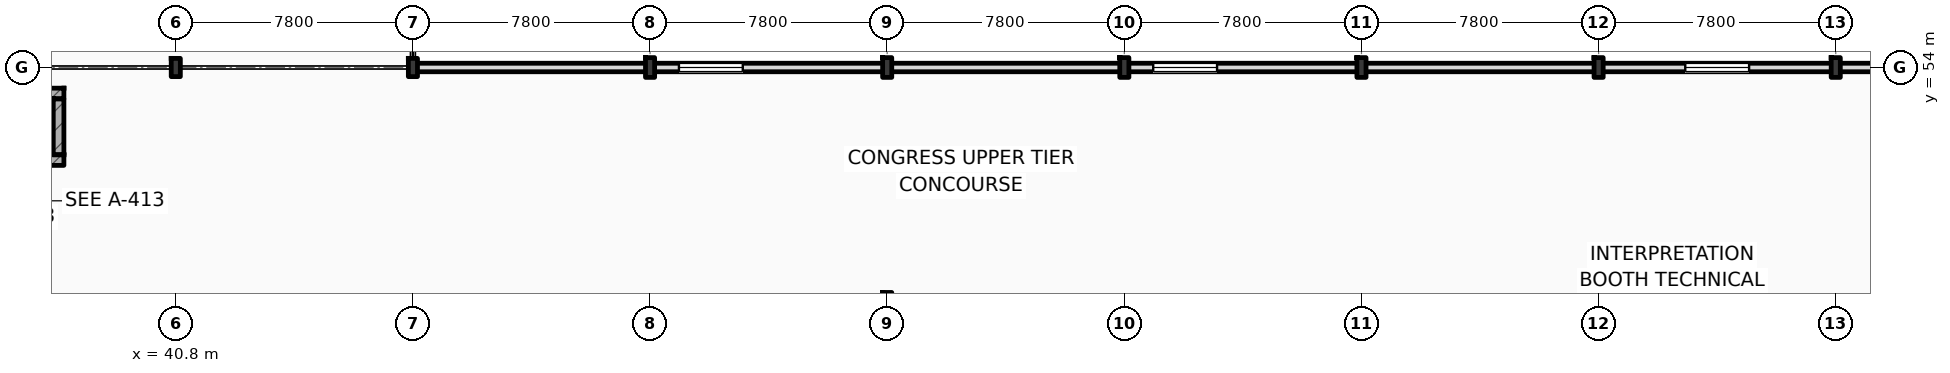
"""IFC4 building model, lengths in metres.
Left out: names, types, materials, properties, quantities, classifications, styles, units other than length and angle.
Written with IfcOpenShell. Run it as: python <this file> out.ifc"""

import sys

from ifc_helpers import new_model, si_unit, direction, frame, frame_2d, origin, origin_2d, place, context, subcontext, project, spatial, rectangle, i_section, extrude, element, fill, save


model = new_model("IFC4")
c1 = context("Model", 3, precision=1e-05, world=origin(), true_north=direction((0.0, 1.0)))
c2 = subcontext(c1, "Body", "Model", "MODEL_VIEW")
j1 = project(units=[si_unit("LENGTHUNIT", "METRE"), si_unit("PLANEANGLEUNIT", "RADIAN")], contexts=[c1])
p1 = place(None, origin())
s1 = spatial("IfcSite", under=j1, at=p1, CompositionType="ELEMENT")
p2 = place(p1, origin())
s2 = spatial("IfcBuilding", under=s1, at=p2, CompositionType="ELEMENT")
p3 = place(p2, frame((0.0, 0.0, 6.0)))
s3 = spatial("IfcBuildingStorey", under=s2, at=p3, CompositionType="ELEMENT", Elevation=6.0)
for number, where, z_axis, x_axis in (
    (1, (40.8, 54.0, 0.0), (0.0, 0.0, 1.0), (1.0, 0.0, 0.0)),
    (2, (48.6, 54.0, 0.0), (0.0, 0.0, 1.0), (1.0, 0.0, 0.0)),
):
    element("IfcColumn", number, at=place(p3, frame(where, z_axis=z_axis, x_axis=x_axis)), inside=s3, PredefinedType="COLUMN", context=c2, shape_type="SweptSolid", body=[
        extrude(i_section(OverallWidth=0.3, OverallDepth=0.6, WebThickness=0.015, FlangeThickness=0.03, FilletRadius=0.027, at=origin_2d()), origin(), (0.0, 0.0, 1.0), 5.4),
    ])
for number, where, z_axis, x_axis in (
    (3, (56.4, 54.0, 0.0), (0.0, 0.0, 1.0), (1.0, 0.0, 0.0)),
    (4, (64.2, 54.0, 0.0), (0.0, 0.0, 1.0), (1.0, 0.0, 0.0)),
    (5, (72.0, 54.0, 0.0), (0.0, 0.0, 1.0), (1.0, 0.0, 0.0)),
    (6, (79.8, 54.0, 0.0), (0.0, 0.0, 1.0), (1.0, 0.0, 0.0)),
    (7, (87.6, 54.0, 0.0), (0.0, 0.0, 1.0), (1.0, 0.0, 0.0)),
    (8, (95.4, 54.0, 0.0), (0.0, 0.0, 1.0), (1.0, 0.0, 0.0)),
):
    element("IfcColumn", number, at=place(p3, frame(where, z_axis=z_axis, x_axis=x_axis)), inside=s3, PredefinedType="COLUMN", context=c2, shape_type="SweptSolid", body=[
        extrude(i_section(OverallWidth=0.3, OverallDepth=0.65, WebThickness=0.016, FlangeThickness=0.031, FilletRadius=0.027, at=origin_2d()), origin(), (0.0, 0.0, 1.0), 5.4),
    ])
p4 = place(p3, frame((64.2, 46.2, 0.0), z_axis=(0.0, 0.0, 1.0), x_axis=(1.0, 0.0, 0.0)))
e9 = element("IfcColumn", 9, at=p4, inside=s3, PredefinedType="COLUMN", context=c2, shape_type="SweptSolid", body=[
    extrude(i_section(OverallWidth=0.3, OverallDepth=0.8, WebThickness=0.018, FlangeThickness=0.033, FilletRadius=0.03, at=origin_2d()), origin(), (0.0, 0.0, 1.0), 5.4),
])
p5 = place(p3, frame((48.6, 54.0, 0.0), z_axis=(0.0, 0.0, 1.0), x_axis=(1.0, 0.0, 0.0)))
e10 = element("IfcWall", 10, at=p5, inside=s3, PredefinedType="STANDARD", context=c2, shape_type="SweptSolid", body=[
    extrude(rectangle(XDim=15.6, YDim=0.28, at=frame_2d((7.8, 0.0))), origin(), (0.0, 0.0, 1.0), 4.54),
])
p6 = place(p5, frame((8.75, 0.0, 1.05)))
e11 = element("IfcOpeningElement", 11, at=p6, cuts=e10, PredefinedType="OPENING", context=c2, shape_type="SweptSolid", body=[
    extrude(rectangle(XDim=2.1, YDim=2.2, at=frame_2d((1.05, 1.1))), frame((0.0, 0.15, 0.0), z_axis=(0.0, -1.0, 0.0), x_axis=(1.0, 0.0, 0.0)), (0.0, 0.0, 1.0), 0.3),
])
p7 = place(p3, frame((64.2, 54.0, 0.0), z_axis=(0.0, 0.0, 1.0), x_axis=(1.0, 0.0, 0.0)))
e12 = element("IfcWall", 12, at=p7, inside=s3, PredefinedType="STANDARD", context=c2, shape_type="SweptSolid", body=[
    extrude(rectangle(XDim=15.6, YDim=0.28, at=frame_2d((7.8, 0.0))), origin(), (0.0, 0.0, 1.0), 4.54),
])
p8 = place(p7, frame((8.75, 0.0, 1.05)))
e13 = element("IfcOpeningElement", 13, at=p8, cuts=e12, PredefinedType="OPENING", context=c2, shape_type="SweptSolid", body=[
    extrude(rectangle(XDim=2.1, YDim=2.2, at=frame_2d((1.05, 1.1))), frame((0.0, 0.15, 0.0), z_axis=(0.0, -1.0, 0.0), x_axis=(1.0, 0.0, 0.0)), (0.0, 0.0, 1.0), 0.3),
])
p9 = place(p3, frame((79.8, 54.0, 0.0), z_axis=(0.0, 0.0, 1.0), x_axis=(1.0, 0.0, 0.0)))
e14 = element("IfcWall", 14, at=p9, inside=s3, PredefinedType="STANDARD", context=c2, shape_type="SweptSolid", body=[
    extrude(rectangle(XDim=23.4, YDim=0.28, at=frame_2d((11.7, 0.0))), origin(), (0.0, 0.0, 1.0), 4.54),
])
p10 = place(p9, frame((10.65, 0.0, 1.05)))
e15 = element("IfcOpeningElement", 15, at=p10, cuts=e14, PredefinedType="OPENING", context=c2, shape_type="SweptSolid", body=[
    extrude(rectangle(XDim=2.1, YDim=2.2, at=frame_2d((1.05, 1.1))), frame((0.0, 0.15, 0.0), z_axis=(0.0, -1.0, 0.0), x_axis=(1.0, 0.0, 0.0)), (0.0, 0.0, 1.0), 0.3),
])
p11 = place(p3, frame((34.08, 53.145, 0.0), z_axis=(0.0, 0.0, 1.0), x_axis=(1.0, 0.0, 0.0)))
e16 = element("IfcWall", 16, at=p11, inside=s3, PredefinedType="SHEAR", context=c2, shape_type="SweptSolid", body=[
    extrude(rectangle(XDim=3.04, YDim=0.35, at=frame_2d((1.52, 0.0))), origin(), (0.0, 0.0, 1.0), 5.05),
])
p12 = place(p3, frame((34.08, 50.955, 0.0), z_axis=(0.0, 0.0, 1.0), x_axis=(1.0, 0.0, 0.0)))
e17 = element("IfcWall", 17, at=p12, inside=s3, PredefinedType="SHEAR", context=c2, shape_type="SweptSolid", body=[
    extrude(rectangle(XDim=3.04, YDim=0.35, at=frame_2d((1.52, 0.0))), origin(), (0.0, 0.0, 1.0), 5.05),
])
p13 = place(p12, frame((0.97, 0.0, 0.0)))
e18 = element("IfcOpeningElement", 18, at=p13, cuts=e17, PredefinedType="OPENING", context=c2, shape_type="SweptSolid", body=[
    extrude(rectangle(XDim=1.1, YDim=2.2, at=frame_2d((0.55, 1.1))), frame((0.0, 0.185, 0.0), z_axis=(0.0, -1.0, 0.0), x_axis=(1.0, 0.0, 0.0)), (0.0, 0.0, 1.0), 0.37),
])
p14 = place(p3, frame((36.945, 51.13, 0.0), z_axis=(0.0, 0.0, 1.0), x_axis=(0.0, 1.0, 0.0)))
e19 = element("IfcWall", 19, at=p14, inside=s3, PredefinedType="SHEAR", context=c2, shape_type="SweptSolid", body=[
    extrude(rectangle(XDim=1.84, YDim=0.35, at=frame_2d((0.92, 0.0))), origin(), (0.0, 0.0, 1.0), 5.05),
])
p15 = place(p6, origin())
e20 = element("IfcWindow", 20, at=p15, inside=s3, PartitioningType="DOUBLE_PANEL_VERTICAL", PredefinedType="WINDOW", context=c2, shape_type="SweptSolid", body=[
    extrude(rectangle(XDim=2.1, YDim=2.2, at=frame_2d((1.05, 1.1))), frame((0.0, 0.03, 0.0), z_axis=(0.0, -1.0, 0.0), x_axis=(1.0, 0.0, 0.0)), (0.0, 0.0, 1.0), 0.06),
])
fill(e11, e20)
p16 = place(p8, origin())
e21 = element("IfcWindow", 21, at=p16, inside=s3, PartitioningType="DOUBLE_PANEL_VERTICAL", PredefinedType="WINDOW", context=c2, shape_type="SweptSolid", body=[
    extrude(rectangle(XDim=2.1, YDim=2.2, at=frame_2d((1.05, 1.1))), frame((0.0, 0.03, 0.0), z_axis=(0.0, -1.0, 0.0), x_axis=(1.0, 0.0, 0.0)), (0.0, 0.0, 1.0), 0.06),
])
fill(e13, e21)
p17 = place(p10, origin())
e22 = element("IfcWindow", 22, at=p17, inside=s3, PartitioningType="DOUBLE_PANEL_VERTICAL", PredefinedType="WINDOW", context=c2, shape_type="SweptSolid", body=[
    extrude(rectangle(XDim=2.1, YDim=2.2, at=frame_2d((1.05, 1.1))), frame((0.0, 0.03, 0.0), z_axis=(0.0, -1.0, 0.0), x_axis=(1.0, 0.0, 0.0)), (0.0, 0.0, 1.0), 0.06),
])
fill(e15, e22)
save(model, sys.argv[1])
